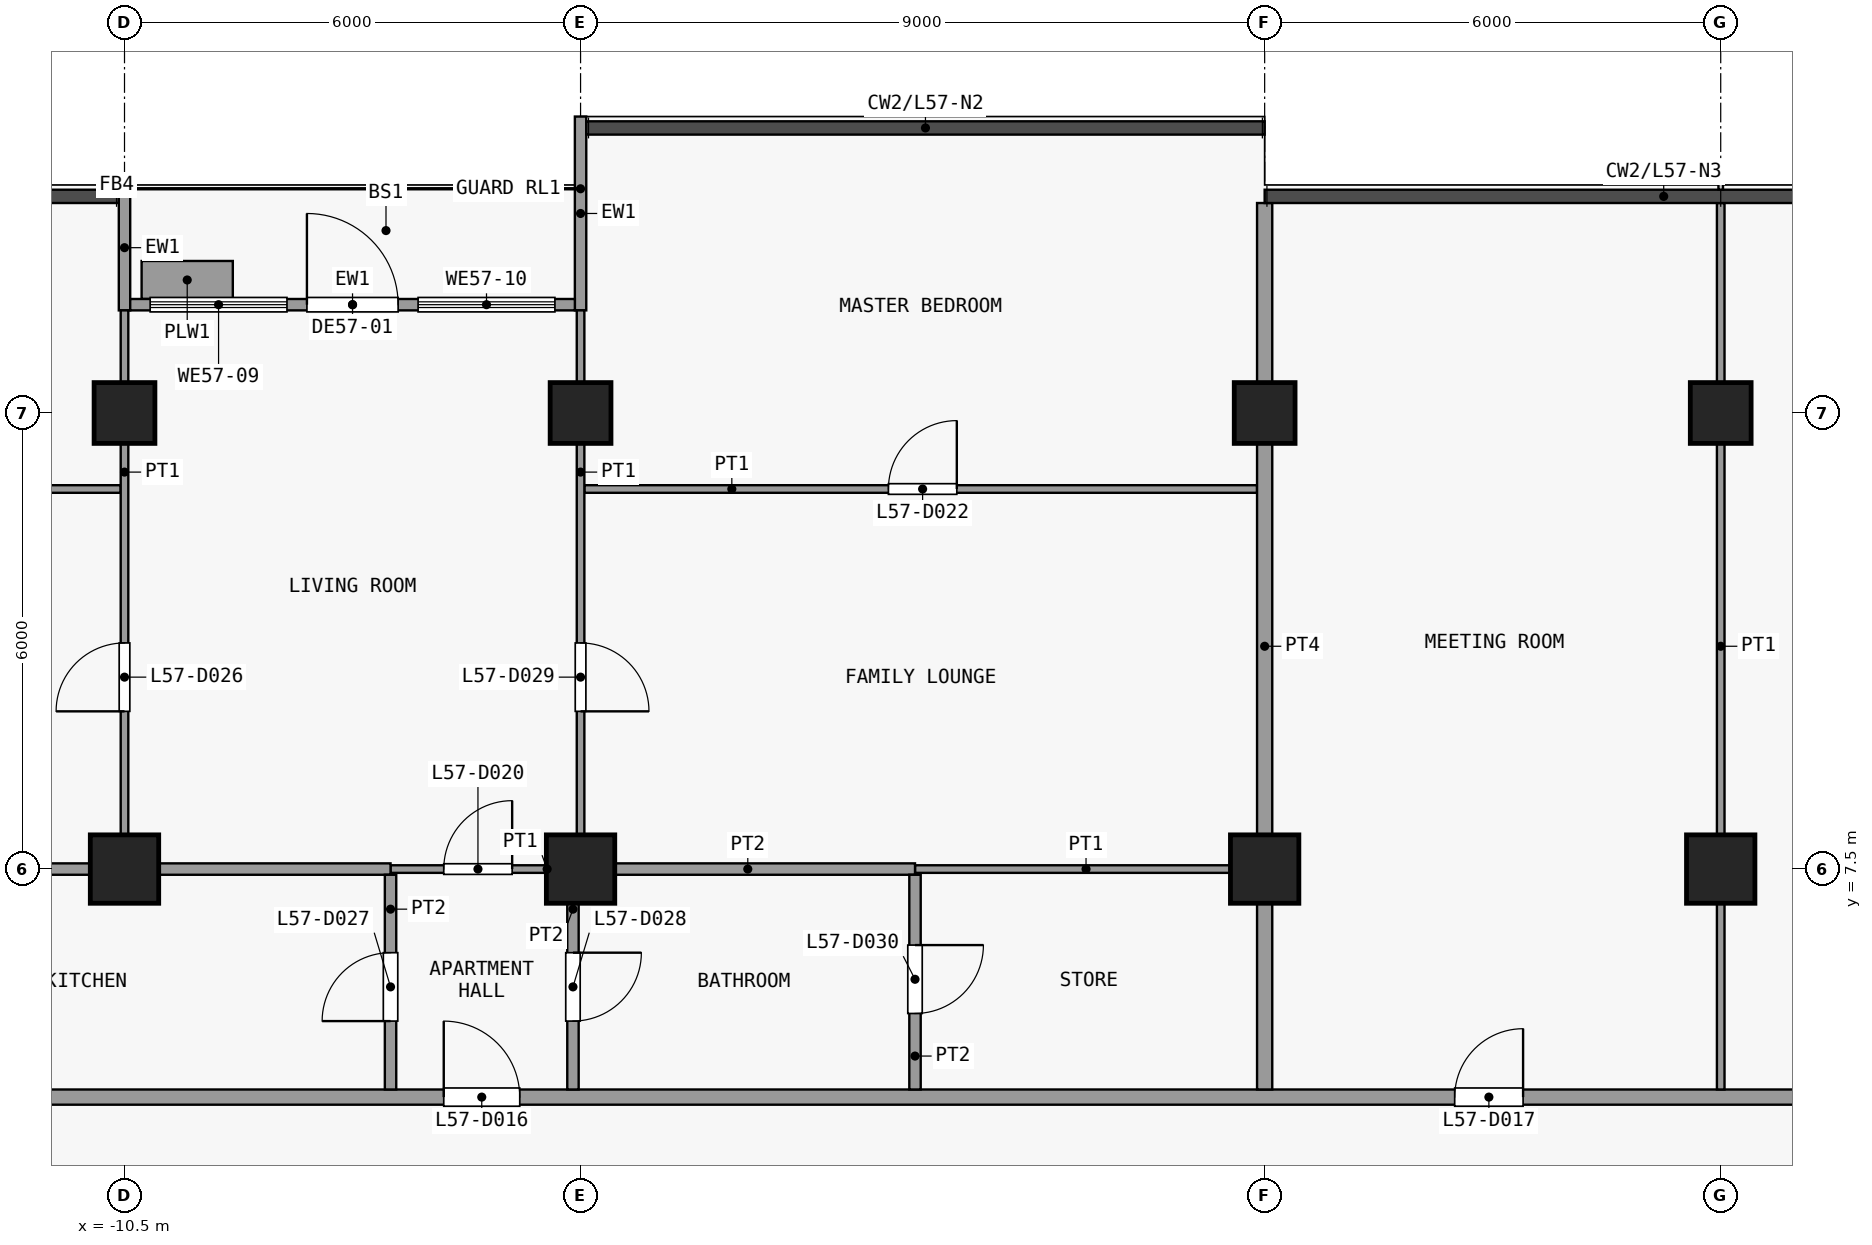
"""IFC4 building model, lengths in metres.
Left out: names, types, materials, properties, quantities, classifications, styles, units other than length and angle.
Written with IfcOpenShell. Run it as: python <this file> out.ifc"""

import sys

from ifc_helpers import new_model, si_unit, direction, frame, frame_2d, origin, origin_2d, place, context, subcontext, project, spatial, rectangle, extrude, element, fill, save


model = new_model("IFC4")
c1 = context("Model", 3, precision=1e-05, world=origin(), true_north=direction((0.0, 1.0)))
c2 = subcontext(c1, "Body", "Model", "MODEL_VIEW")
j1 = project(units=[si_unit("LENGTHUNIT", "METRE"), si_unit("PLANEANGLEUNIT", "RADIAN")], contexts=[c1])
p1 = place(None, origin())
s1 = spatial("IfcSite", under=j1, at=p1, CompositionType="ELEMENT")
p2 = place(p1, origin())
s2 = spatial("IfcBuilding", under=s1, at=p2, CompositionType="ELEMENT")
p3 = place(p2, frame((0.0, 0.0, 226.7)))
s3 = spatial("IfcBuildingStorey", under=s2, at=p3, CompositionType="ELEMENT", Elevation=226.7)
p4 = place(p3, frame((-10.5, 7.5, 0.0), z_axis=(0.0, 0.0, 1.0), x_axis=(1.0, 0.0, 0.0)))
e1 = element("IfcColumn", 1, at=p4, inside=s3, PredefinedType="COLUMN", context=c2, shape_type="SweptSolid", body=[
    extrude(rectangle(XDim=0.9, YDim=0.9, at=origin_2d()), origin(), (0.0, 0.0, 1.0), 3.6),
])
p5 = place(p3, frame((-10.5, 13.5, 0.0), z_axis=(0.0, 0.0, 1.0), x_axis=(1.0, 0.0, 0.0)))
e2 = element("IfcColumn", 2, at=p5, inside=s3, PredefinedType="COLUMN", context=c2, shape_type="SweptSolid", body=[
    extrude(rectangle(XDim=0.8, YDim=0.8, at=origin_2d()), origin(), (0.0, 0.0, 1.0), 3.6),
])
p6 = place(p3, frame((-4.5, 7.5, 0.0), z_axis=(0.0, 0.0, 1.0), x_axis=(1.0, 0.0, 0.0)))
e3 = element("IfcColumn", 3, at=p6, inside=s3, PredefinedType="COLUMN", context=c2, shape_type="SweptSolid", body=[
    extrude(rectangle(XDim=0.9, YDim=0.9, at=origin_2d()), origin(), (0.0, 0.0, 1.0), 3.6),
])
p7 = place(p3, frame((-4.5, 13.5, 0.0), z_axis=(0.0, 0.0, 1.0), x_axis=(1.0, 0.0, 0.0)))
e4 = element("IfcColumn", 4, at=p7, inside=s3, PredefinedType="COLUMN", context=c2, shape_type="SweptSolid", body=[
    extrude(rectangle(XDim=0.8, YDim=0.8, at=origin_2d()), origin(), (0.0, 0.0, 1.0), 3.6),
])
p8 = place(p3, frame((4.5, 7.5, 0.0), z_axis=(0.0, 0.0, 1.0), x_axis=(1.0, 0.0, 0.0)))
e5 = element("IfcColumn", 5, at=p8, inside=s3, PredefinedType="COLUMN", context=c2, shape_type="SweptSolid", body=[
    extrude(rectangle(XDim=0.9, YDim=0.9, at=origin_2d()), origin(), (0.0, 0.0, 1.0), 3.6),
])
p9 = place(p3, frame((4.5, 13.5, 0.0), z_axis=(0.0, 0.0, 1.0), x_axis=(1.0, 0.0, 0.0)))
e6 = element("IfcColumn", 6, at=p9, inside=s3, PredefinedType="COLUMN", context=c2, shape_type="SweptSolid", body=[
    extrude(rectangle(XDim=0.8, YDim=0.8, at=origin_2d()), origin(), (0.0, 0.0, 1.0), 3.6),
])
p10 = place(p3, frame((10.5, 7.5, 0.0), z_axis=(0.0, 0.0, 1.0), x_axis=(1.0, 0.0, 0.0)))
e7 = element("IfcColumn", 7, at=p10, inside=s3, PredefinedType="COLUMN", context=c2, shape_type="SweptSolid", body=[
    extrude(rectangle(XDim=0.9, YDim=0.9, at=origin_2d()), origin(), (0.0, 0.0, 1.0), 3.6),
])
p11 = place(p3, frame((10.5, 13.5, 0.0), z_axis=(0.0, 0.0, 1.0), x_axis=(1.0, 0.0, 0.0)))
e8 = element("IfcColumn", 8, at=p11, inside=s3, PredefinedType="COLUMN", context=c2, shape_type="SweptSolid", body=[
    extrude(rectangle(XDim=0.8, YDim=0.8, at=origin_2d()), origin(), (0.0, 0.0, 1.0), 3.6),
])
p12 = place(p3, frame((-10.5, 14.85, 0.0), z_axis=(0.0, 0.0, 1.0), x_axis=(0.0, 1.0, 0.0)))
e9 = element("IfcWall", 9, at=p12, inside=s3, PredefinedType="SOLIDWALL", context=c2, shape_type="SweptSolid", body=[
    extrude(rectangle(XDim=1.65, YDim=0.15, at=frame_2d((0.825, 0.0))), origin(), (0.0, 0.0, 1.0), 3.3),
])
p13 = place(p3, frame((-4.5, 14.85, 0.0), z_axis=(0.0, 0.0, 1.0), x_axis=(0.0, 1.0, 0.0)))
e10 = element("IfcWall", 10, at=p13, inside=s3, PredefinedType="SOLIDWALL", context=c2, shape_type="SweptSolid", body=[
    extrude(rectangle(XDim=2.55, YDim=0.15, at=frame_2d((1.275, 0.0))), origin(), (0.0, 0.0, 1.0), 3.3),
])
p14 = place(p3, frame((-10.425, 14.925, 0.0), z_axis=(0.0, 0.0, 1.0), x_axis=(1.0, 0.0, 0.0)))
e11 = element("IfcWall", 11, at=p14, inside=s3, PredefinedType="SOLIDWALL", context=c2, shape_type="SweptSolid", body=[
    extrude(rectangle(XDim=5.85, YDim=0.15, at=frame_2d((2.925, 0.0))), origin(), (0.0, 0.0, 1.0), 3.3),
])
p15 = place(p14, frame((2.325, 0.0, 0.0)))
e12 = element("IfcOpeningElement", 12, at=p15, cuts=e11, PredefinedType="OPENING", context=c2, shape_type="SweptSolid", body=[
    extrude(rectangle(XDim=1.2, YDim=2.4, at=frame_2d((0.6, 1.2))), frame((0.0, 0.085, 0.0), z_axis=(0.0, -1.0, 0.0), x_axis=(1.0, 0.0, 0.0)), (0.0, 0.0, 1.0), 0.17),
])
p16 = place(p14, frame((0.262, 0.0, 0.9)))
e13 = element("IfcOpeningElement", 13, at=p16, cuts=e11, PredefinedType="OPENING", context=c2, shape_type="SweptSolid", body=[
    extrude(rectangle(XDim=1.8, YDim=2.1, at=frame_2d((0.9, 1.05))), frame((0.0, 0.085, 0.0), z_axis=(0.0, -1.0, 0.0), x_axis=(1.0, 0.0, 0.0)), (0.0, 0.0, 1.0), 0.17),
])
p17 = place(p14, frame((3.788, 0.0, 0.9)))
e14 = element("IfcOpeningElement", 14, at=p17, cuts=e11, PredefinedType="OPENING", context=c2, shape_type="SweptSolid", body=[
    extrude(rectangle(XDim=1.8, YDim=2.1, at=frame_2d((0.9, 1.05))), frame((0.0, 0.085, 0.0), z_axis=(0.0, -1.0, 0.0), x_axis=(1.0, 0.0, 0.0)), (0.0, 0.0, 1.0), 0.17),
])
p18 = place(p3, frame((-10.275, 15.25, 0.0), z_axis=(0.0, 0.0, 1.0), x_axis=(1.0, 0.0, 0.0)))
e15 = element("IfcWall", 15, at=p18, inside=s3, PredefinedType="USERDEFINED", context=c2, shape_type="SweptSolid", body=[
    extrude(rectangle(XDim=1.2, YDim=0.5, at=frame_2d((0.6, 0.0))), origin(), (0.0, 0.0, 1.0), 0.9),
])
p19 = place(p3, frame((-19.35, 4.5, 0.0), z_axis=(0.0, 0.0, 1.0), x_axis=(1.0, 0.0, 0.0)))
e16 = element("IfcWall", 16, at=p19, inside=s3, PredefinedType="PARTITIONING", context=c2, shape_type="SweptSolid", body=[
    extrude(rectangle(XDim=39.6, YDim=0.2, at=frame_2d((19.8, 0.0))), origin(), (0.0, 0.0, 1.0), 3.3),
])
p20 = place(p19, frame((13.05, 0.0, 0.0)))
e17 = element("IfcOpeningElement", 17, at=p20, cuts=e16, PredefinedType="OPENING", context=c2, shape_type="SweptSolid", body=[
    extrude(rectangle(XDim=1.0, YDim=2.1, at=frame_2d((0.5, 1.05))), frame((0.0, 0.11, 0.0), z_axis=(0.0, -1.0, 0.0), x_axis=(1.0, 0.0, 0.0)), (0.0, 0.0, 1.0), 0.22),
])
p21 = place(p19, frame((26.35, 0.0, 0.0)))
e18 = element("IfcOpeningElement", 18, at=p21, cuts=e16, PredefinedType="OPENING", context=c2, shape_type="SweptSolid", body=[
    extrude(rectangle(XDim=0.9, YDim=2.1, at=frame_2d((0.45, 1.05))), frame((0.0, 0.11, 0.0), z_axis=(0.0, -1.0, 0.0), x_axis=(1.0, 0.0, 0.0)), (0.0, 0.0, 1.0), 0.22),
])
p22 = place(p19, frame((32.35, 0.0, 0.0)))
e19 = element("IfcOpeningElement", 19, at=p22, cuts=e16, PredefinedType="OPENING", context=c2, shape_type="SweptSolid", body=[
    extrude(rectangle(XDim=0.9, YDim=2.1, at=frame_2d((0.45, 1.05))), frame((0.0, 0.11, 0.0), z_axis=(0.0, -1.0, 0.0), x_axis=(1.0, 0.0, 0.0)), (0.0, 0.0, 1.0), 0.22),
])
p23 = place(p19, frame((37.25, 0.0, 0.0)))
e20 = element("IfcOpeningElement", 20, at=p23, cuts=e16, PredefinedType="OPENING", context=c2, shape_type="SweptSolid", body=[
    extrude(rectangle(XDim=0.9, YDim=2.1, at=frame_2d((0.45, 1.05))), frame((0.0, 0.11, 0.0), z_axis=(0.0, -1.0, 0.0), x_axis=(1.0, 0.0, 0.0)), (0.0, 0.0, 1.0), 0.22),
])
p24 = place(p3, frame((-7.0, 7.5, 0.0), z_axis=(0.0, 0.0, 1.0), x_axis=(1.0, 0.0, 0.0)))
e21 = element("IfcWall", 21, at=p24, inside=s3, PredefinedType="PARTITIONING", context=c2, shape_type="SweptSolid", body=[
    extrude(rectangle(XDim=2.4, YDim=0.1, at=frame_2d((1.2, 0.0))), origin(), (0.0, 0.0, 1.0), 3.3),
])
p25 = place(p24, frame((0.7, 0.0, 0.0)))
e22 = element("IfcOpeningElement", 22, at=p25, cuts=e21, PredefinedType="OPENING", context=c2, shape_type="SweptSolid", body=[
    extrude(rectangle(XDim=0.9, YDim=2.1, at=frame_2d((0.45, 1.05))), frame((0.0, 0.06, 0.0), z_axis=(0.0, -1.0, 0.0), x_axis=(1.0, 0.0, 0.0)), (0.0, 0.0, 1.0), 0.12),
])
p26 = place(p3, frame((-0.1, 7.5, 0.0), z_axis=(0.0, 0.0, 1.0), x_axis=(1.0, 0.0, 0.0)))
e23 = element("IfcWall", 23, at=p26, inside=s3, PredefinedType="PARTITIONING", context=c2, shape_type="SweptSolid", body=[
    extrude(rectangle(XDim=4.5, YDim=0.1, at=frame_2d((2.25, 0.0))), origin(), (0.0, 0.0, 1.0), 3.3),
])
p27 = place(p3, frame((-19.262, 7.5, 0.0), z_axis=(0.0, 0.0, 1.0), x_axis=(1.0, 0.0, 0.0)))
e24 = element("IfcWall", 24, at=p27, inside=s3, PredefinedType="PARTITIONING", context=c2, shape_type="SweptSolid", body=[
    extrude(rectangle(XDim=12.262, YDim=0.15, at=frame_2d((6.131, 0.0))), origin(), (0.0, 0.0, 1.0), 3.3),
])
p28 = place(p3, frame((-4.5, 7.5, 0.0), z_axis=(0.0, 0.0, 1.0), x_axis=(1.0, 0.0, 0.0)))
e25 = element("IfcWall", 25, at=p28, inside=s3, PredefinedType="PARTITIONING", context=c2, shape_type="SweptSolid", body=[
    extrude(rectangle(XDim=4.4, YDim=0.15, at=frame_2d((2.2, 0.0))), origin(), (0.0, 0.0, 1.0), 3.3),
])
p29 = place(p3, frame((-14.85, 12.5, 0.0), z_axis=(0.0, 0.0, 1.0), x_axis=(1.0, 0.0, 0.0)))
e26 = element("IfcWall", 26, at=p29, inside=s3, PredefinedType="PARTITIONING", context=c2, shape_type="SweptSolid", body=[
    extrude(rectangle(XDim=4.3, YDim=0.1, at=frame_2d((2.15, 0.0))), origin(), (0.0, 0.0, 1.0), 3.3),
])
p30 = place(p29, frame((1.7, 0.0, 0.0)))
e27 = element("IfcOpeningElement", 27, at=p30, cuts=e26, PredefinedType="OPENING", context=c2, shape_type="SweptSolid", body=[
    extrude(rectangle(XDim=0.9, YDim=2.1, at=frame_2d((0.45, 1.05))), frame((0.0, 0.06, 0.0), z_axis=(0.0, -1.0, 0.0), x_axis=(1.0, 0.0, 0.0)), (0.0, 0.0, 1.0), 0.12),
])
p31 = place(p3, frame((-4.45, 12.5, 0.0), z_axis=(0.0, 0.0, 1.0), x_axis=(1.0, 0.0, 0.0)))
e28 = element("IfcWall", 28, at=p31, inside=s3, PredefinedType="PARTITIONING", context=c2, shape_type="SweptSolid", body=[
    extrude(rectangle(XDim=8.85, YDim=0.1, at=frame_2d((4.425, 0.0))), origin(), (0.0, 0.0, 1.0), 3.3),
])
p32 = place(p31, frame((4.0, 0.0, 0.0)))
e29 = element("IfcOpeningElement", 29, at=p32, cuts=e28, PredefinedType="OPENING", context=c2, shape_type="SweptSolid", body=[
    extrude(rectangle(XDim=0.9, YDim=2.1, at=frame_2d((0.45, 1.05))), frame((0.0, 0.06, 0.0), z_axis=(0.0, -1.0, 0.0), x_axis=(1.0, 0.0, 0.0)), (0.0, 0.0, 1.0), 0.12),
])
p33 = place(p3, frame((-10.5, 7.575, 0.0), z_axis=(0.0, 0.0, 1.0), x_axis=(0.0, 1.0, 0.0)))
e30 = element("IfcWall", 30, at=p33, inside=s3, PredefinedType="PARTITIONING", context=c2, shape_type="SweptSolid", body=[
    extrude(rectangle(XDim=7.275, YDim=0.1, at=frame_2d((3.638, 0.0))), origin(), (0.0, 0.0, 1.0), 3.3),
])
p34 = place(p33, frame((2.0, 0.0, 0.0)))
e31 = element("IfcOpeningElement", 31, at=p34, cuts=e30, PredefinedType="OPENING", context=c2, shape_type="SweptSolid", body=[
    extrude(rectangle(XDim=0.9, YDim=2.1, at=frame_2d((0.45, 1.05))), frame((0.0, 0.06, 0.0), z_axis=(0.0, -1.0, 0.0), x_axis=(1.0, 0.0, 0.0)), (0.0, 0.0, 1.0), 0.12),
])
p35 = place(p3, frame((-7.0, 4.6, 0.0), z_axis=(0.0, 0.0, 1.0), x_axis=(0.0, 1.0, 0.0)))
e32 = element("IfcWall", 32, at=p35, inside=s3, PredefinedType="PARTITIONING", context=c2, shape_type="SweptSolid", body=[
    extrude(rectangle(XDim=2.825, YDim=0.15, at=frame_2d((1.413, 0.0))), origin(), (0.0, 0.0, 1.0), 3.3),
])
p36 = place(p35, frame((0.9, 0.0, 0.0)))
e33 = element("IfcOpeningElement", 33, at=p36, cuts=e32, PredefinedType="OPENING", context=c2, shape_type="SweptSolid", body=[
    extrude(rectangle(XDim=0.9, YDim=2.1, at=frame_2d((0.45, 1.05))), frame((0.0, 0.085, 0.0), z_axis=(0.0, -1.0, 0.0), x_axis=(1.0, 0.0, 0.0)), (0.0, 0.0, 1.0), 0.17),
])
p37 = place(p3, frame((-4.6, 4.6, 0.0), z_axis=(0.0, 0.0, 1.0), x_axis=(0.0, 1.0, 0.0)))
e34 = element("IfcWall", 34, at=p37, inside=s3, PredefinedType="PARTITIONING", context=c2, shape_type="SweptSolid", body=[
    extrude(rectangle(XDim=2.825, YDim=0.15, at=frame_2d((1.413, 0.0))), origin(), (0.0, 0.0, 1.0), 3.3),
])
p38 = place(p37, frame((0.9, 0.0, 0.0)))
e35 = element("IfcOpeningElement", 35, at=p38, cuts=e34, PredefinedType="OPENING", context=c2, shape_type="SweptSolid", body=[
    extrude(rectangle(XDim=0.9, YDim=2.1, at=frame_2d((0.45, 1.05))), frame((0.0, 0.085, 0.0), z_axis=(0.0, -1.0, 0.0), x_axis=(1.0, 0.0, 0.0)), (0.0, 0.0, 1.0), 0.17),
])
p39 = place(p3, frame((-4.5, 7.575, 0.0), z_axis=(0.0, 0.0, 1.0), x_axis=(0.0, 1.0, 0.0)))
e36 = element("IfcWall", 36, at=p39, inside=s3, PredefinedType="PARTITIONING", context=c2, shape_type="SweptSolid", body=[
    extrude(rectangle(XDim=7.275, YDim=0.1, at=frame_2d((3.638, 0.0))), origin(), (0.0, 0.0, 1.0), 3.3),
])
p40 = place(p39, frame((2.0, 0.0, 0.0)))
e37 = element("IfcOpeningElement", 37, at=p40, cuts=e36, PredefinedType="OPENING", context=c2, shape_type="SweptSolid", body=[
    extrude(rectangle(XDim=0.9, YDim=2.1, at=frame_2d((0.45, 1.05))), frame((0.0, 0.06, 0.0), z_axis=(0.0, -1.0, 0.0), x_axis=(1.0, 0.0, 0.0)), (0.0, 0.0, 1.0), 0.12),
])
p41 = place(p3, frame((-0.1, 4.6, 0.0), z_axis=(0.0, 0.0, 1.0), x_axis=(0.0, 1.0, 0.0)))
e38 = element("IfcWall", 38, at=p41, inside=s3, PredefinedType="PARTITIONING", context=c2, shape_type="SweptSolid", body=[
    extrude(rectangle(XDim=2.825, YDim=0.15, at=frame_2d((1.413, 0.0))), origin(), (0.0, 0.0, 1.0), 3.3),
])
p42 = place(p41, frame((1.0, 0.0, 0.0)))
e39 = element("IfcOpeningElement", 39, at=p42, cuts=e38, PredefinedType="OPENING", context=c2, shape_type="SweptSolid", body=[
    extrude(rectangle(XDim=0.9, YDim=2.1, at=frame_2d((0.45, 1.05))), frame((0.0, 0.085, 0.0), z_axis=(0.0, -1.0, 0.0), x_axis=(1.0, 0.0, 0.0)), (0.0, 0.0, 1.0), 0.17),
])
p43 = place(p3, frame((4.5, 4.6, 0.0), z_axis=(0.0, 0.0, 1.0), x_axis=(0.0, 1.0, 0.0)))
e40 = element("IfcWall", 40, at=p43, inside=s3, PredefinedType="PARTITIONING", context=c2, shape_type="SweptSolid", body=[
    extrude(rectangle(XDim=11.662, YDim=0.2, at=frame_2d((5.831, 0.0))), origin(), (0.0, 0.0, 1.0), 3.3),
])
p44 = place(p3, frame((10.5, 4.6, 0.0), z_axis=(0.0, 0.0, 1.0), x_axis=(0.0, 1.0, 0.0)))
e41 = element("IfcWall", 41, at=p44, inside=s3, PredefinedType="PARTITIONING", context=c2, shape_type="SweptSolid", body=[
    extrude(rectangle(XDim=11.662, YDim=0.1, at=frame_2d((5.831, 0.0))), origin(), (0.0, 0.0, 1.0), 3.3),
])
p45 = place(p15, origin())
e42 = element("IfcDoor", 42, at=p45, inside=s3, OperationType="SINGLE_SWING_LEFT", PredefinedType="DOOR", context=c2, shape_type="SweptSolid", body=[
    extrude(rectangle(XDim=1.2, YDim=2.4, at=frame_2d((0.6, 1.2))), frame((0.0, 0.025, 0.0), z_axis=(0.0, -1.0, 0.0), x_axis=(1.0, 0.0, 0.0)), (0.0, 0.0, 1.0), 0.05),
])
fill(e12, e42)
p46 = place(p16, origin())
e43 = element("IfcWindow", 43, at=p46, inside=s3, PartitioningType="SINGLE_PANEL", PredefinedType="WINDOW", context=c2, shape_type="SweptSolid", body=[
    extrude(rectangle(XDim=1.8, YDim=2.1, at=frame_2d((0.9, 1.05))), frame((0.0, 0.03, 0.0), z_axis=(0.0, -1.0, 0.0), x_axis=(1.0, 0.0, 0.0)), (0.0, 0.0, 1.0), 0.06),
])
fill(e13, e43)
p47 = place(p17, origin())
e44 = element("IfcWindow", 44, at=p47, inside=s3, PartitioningType="SINGLE_PANEL", PredefinedType="WINDOW", context=c2, shape_type="SweptSolid", body=[
    extrude(rectangle(XDim=1.8, YDim=2.1, at=frame_2d((0.9, 1.05))), frame((0.0, 0.03, 0.0), z_axis=(0.0, -1.0, 0.0), x_axis=(1.0, 0.0, 0.0)), (0.0, 0.0, 1.0), 0.06),
])
fill(e14, e44)
p48 = place(p20, origin())
e45 = element("IfcDoor", 45, at=p48, inside=s3, OperationType="SINGLE_SWING_RIGHT", PredefinedType="DOOR", context=c2, shape_type="SweptSolid", body=[
    extrude(rectangle(XDim=1.0, YDim=2.1, at=frame_2d((0.5, 1.05))), frame((0.0, 0.025, 0.0), z_axis=(0.0, -1.0, 0.0), x_axis=(1.0, 0.0, 0.0)), (0.0, 0.0, 1.0), 0.05),
])
fill(e17, e45)
p49 = place(p21, origin())
e46 = element("IfcDoor", 46, at=p49, inside=s3, OperationType="SINGLE_SWING_LEFT", PredefinedType="DOOR", context=c2, shape_type="SweptSolid", body=[
    extrude(rectangle(XDim=0.9, YDim=2.1, at=frame_2d((0.45, 1.05))), frame((0.0, 0.025, 0.0), z_axis=(0.0, -1.0, 0.0), x_axis=(1.0, 0.0, 0.0)), (0.0, 0.0, 1.0), 0.05),
])
fill(e18, e46)
p50 = place(p25, origin())
e47 = element("IfcDoor", 47, at=p50, inside=s3, OperationType="SINGLE_SWING_LEFT", PredefinedType="DOOR", context=c2, shape_type="SweptSolid", body=[
    extrude(rectangle(XDim=0.9, YDim=2.1, at=frame_2d((0.45, 1.05))), frame((0.0, 0.025, 0.0), z_axis=(0.0, -1.0, 0.0), x_axis=(1.0, 0.0, 0.0)), (0.0, 0.0, 1.0), 0.05),
])
fill(e22, e47)
p51 = place(p32, origin())
e48 = element("IfcDoor", 48, at=p51, inside=s3, OperationType="SINGLE_SWING_LEFT", PredefinedType="DOOR", context=c2, shape_type="SweptSolid", body=[
    extrude(rectangle(XDim=0.9, YDim=2.1, at=frame_2d((0.45, 1.05))), frame((0.0, 0.025, 0.0), z_axis=(0.0, -1.0, 0.0), x_axis=(1.0, 0.0, 0.0)), (0.0, 0.0, 1.0), 0.05),
])
fill(e29, e48)
p52 = place(p34, origin())
e49 = element("IfcDoor", 49, at=p52, inside=s3, OperationType="SINGLE_SWING_RIGHT", PredefinedType="DOOR", context=c2, shape_type="SweptSolid", body=[
    extrude(rectangle(XDim=0.9, YDim=2.1, at=frame_2d((0.45, 1.05))), frame((0.0, 0.025, 0.0), z_axis=(0.0, -1.0, 0.0), x_axis=(1.0, 0.0, 0.0)), (0.0, 0.0, 1.0), 0.05),
])
fill(e31, e49)
p53 = place(p36, origin())
e50 = element("IfcDoor", 50, at=p53, inside=s3, OperationType="SINGLE_SWING_RIGHT", PredefinedType="DOOR", context=c2, shape_type="SweptSolid", body=[
    extrude(rectangle(XDim=0.9, YDim=2.1, at=frame_2d((0.45, 1.05))), frame((0.0, 0.025, 0.0), z_axis=(0.0, -1.0, 0.0), x_axis=(1.0, 0.0, 0.0)), (0.0, 0.0, 1.0), 0.05),
])
fill(e33, e50)
p54 = place(p38, origin())
e51 = element("IfcDoor", 51, at=p54, inside=s3, OperationType="SINGLE_SWING_RIGHT", PredefinedType="DOOR", context=c2, shape_type="SweptSolid", body=[
    extrude(rectangle(XDim=0.9, YDim=2.1, at=frame_2d((0.45, 1.05))), frame((0.0, 0.025, 0.0), z_axis=(0.0, -1.0, 0.0), x_axis=(1.0, 0.0, 0.0)), (0.0, 0.0, 1.0), 0.05),
])
fill(e35, e51)
p55 = place(p40, origin())
e52 = element("IfcDoor", 52, at=p55, inside=s3, OperationType="SINGLE_SWING_LEFT", PredefinedType="DOOR", context=c2, shape_type="SweptSolid", body=[
    extrude(rectangle(XDim=0.9, YDim=2.1, at=frame_2d((0.45, 1.05))), frame((0.0, 0.025, 0.0), z_axis=(0.0, -1.0, 0.0), x_axis=(1.0, 0.0, 0.0)), (0.0, 0.0, 1.0), 0.05),
])
fill(e37, e52)
p56 = place(p42, origin())
e53 = element("IfcDoor", 53, at=p56, inside=s3, OperationType="SINGLE_SWING_RIGHT", PredefinedType="DOOR", context=c2, shape_type="SweptSolid", body=[
    extrude(rectangle(XDim=0.9, YDim=2.1, at=frame_2d((0.45, 1.05))), frame((0.0, 0.025, 0.0), z_axis=(0.0, -1.0, 0.0), x_axis=(1.0, 0.0, 0.0)), (0.0, 0.0, 1.0), 0.05),
])
fill(e39, e53)
save(model, sys.argv[1])
